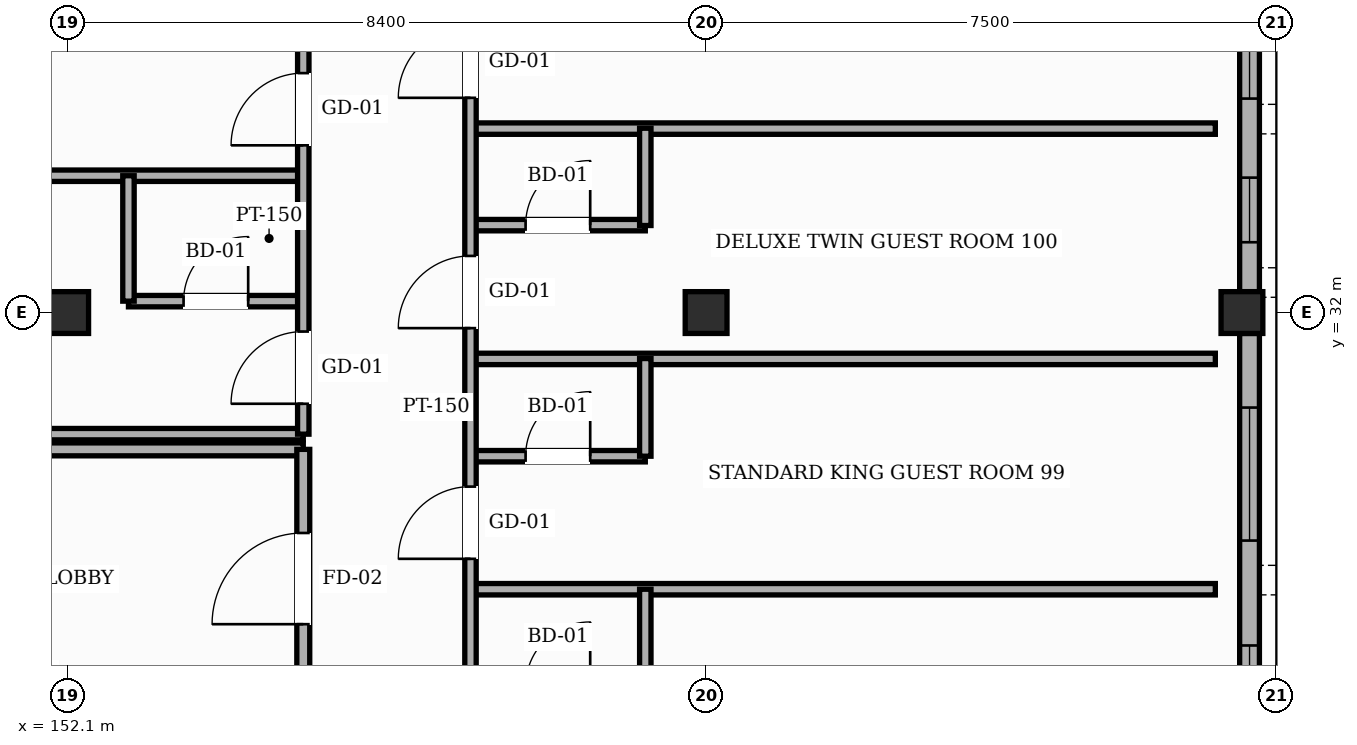
"""IFC4 building model, lengths in metres.
Left out: names, types, materials, properties, quantities, classifications, styles, units other than length and angle.
Written with IfcOpenShell. Run it as: python <this file> out.ifc"""

import sys

from ifc_helpers import new_model, si_unit, direction, frame, frame_2d, origin, origin_2d, place, context, subcontext, project, spatial, rectangle, hollow_rectangle, extrude, element, fill, save


model = new_model("IFC4")
c1 = context("Model", 3, precision=1e-05, world=origin(), true_north=direction((0.0, 1.0)))
c2 = subcontext(c1, "Body", "Model", "MODEL_VIEW")
j1 = project(units=[si_unit("LENGTHUNIT", "METRE"), si_unit("PLANEANGLEUNIT", "RADIAN")], contexts=[c1])
p1 = place(None, origin())
s1 = spatial("IfcSite", under=j1, at=p1, CompositionType="ELEMENT")
p2 = place(p1, origin())
s2 = spatial("IfcBuilding", under=s1, at=p2, CompositionType="ELEMENT")
p3 = place(p2, frame((0.0, 0.0, 24.6)))
s3 = spatial("IfcBuildingStorey", under=s2, at=p3, CompositionType="ELEMENT", Elevation=24.6)
for number, where, z_axis, x_axis in (
    (1, (152.1, 32.0, 0.0), (0.0, 0.0, 1.0), (1.0, 0.0, 0.0)),
    (2, (160.5, 32.0, 0.0), (0.0, 0.0, 1.0), (1.0, 0.0, 0.0)),
    (3, (167.55, 32.0, 0.0), (0.0, 0.0, 1.0), (1.0, 0.0, 0.0)),
):
    element("IfcColumn", number, at=place(p3, frame(where, z_axis=z_axis, x_axis=x_axis)), inside=s3, PredefinedType="COLUMN", context=c2, shape_type="SweptSolid", body=[
        extrude(hollow_rectangle(XDim=0.55, YDim=0.55, WallThickness=0.022, InnerFilletRadius=0.022, OuterFilletRadius=0.044, at=origin_2d()), origin(), (0.0, 0.0, 1.0), 3.6),
    ])
p4 = place(p3, frame((167.65, 31.725, 0.0), z_axis=(0.0, 0.0, 1.0), x_axis=(0.0, -1.0, 0.0)))
e4 = element("IfcWall", 4, at=p4, inside=s3, PredefinedType="SOLIDWALL", context=c2, shape_type="SweptSolid", body=[
    extrude(rectangle(XDim=7.45, YDim=0.26, at=frame_2d((3.725, 0.0))), origin(), (0.0, 0.0, 1.0), 2.755),
])
p5 = place(p4, frame((4.105, 0.0, 0.85)))
e5 = element("IfcOpeningElement", 5, at=p5, cuts=e4, PredefinedType="OPENING", context=c2, shape_type="SweptSolid", body=[
    extrude(rectangle(XDim=1.55, YDim=1.35, at=frame_2d((0.775, 0.675))), frame((0.0, 0.14, 0.0), z_axis=(0.0, -1.0, 0.0), x_axis=(1.0, 0.0, 0.0)), (0.0, 0.0, 1.0), 0.28),
])
p6 = place(p4, frame((0.975, 0.0, 0.85)))
e6 = element("IfcOpeningElement", 6, at=p6, cuts=e4, PredefinedType="OPENING", context=c2, shape_type="SweptSolid", body=[
    extrude(rectangle(XDim=1.75, YDim=1.35, at=frame_2d((0.875, 0.675))), frame((0.0, 0.14, 0.0), z_axis=(0.0, -1.0, 0.0), x_axis=(1.0, 0.0, 0.0)), (0.0, 0.0, 1.0), 0.28),
])
p7 = place(p3, frame((167.65, 40.625, 0.0), z_axis=(0.0, 0.0, 1.0), x_axis=(0.0, -1.0, 0.0)))
e7 = element("IfcWall", 7, at=p7, inside=s3, PredefinedType="SOLIDWALL", context=c2, shape_type="SweptSolid", body=[
    extrude(rectangle(XDim=8.35, YDim=0.26, at=frame_2d((4.175, 0.0))), origin(), (0.0, 0.0, 1.0), 2.755),
])
p8 = place(p7, frame((6.85, 0.0, 0.85)))
e8 = element("IfcOpeningElement", 8, at=p8, cuts=e7, PredefinedType="OPENING", context=c2, shape_type="SweptSolid", body=[
    extrude(rectangle(XDim=0.85, YDim=1.35, at=frame_2d((0.425, 0.675))), frame((0.0, 0.14, 0.0), z_axis=(0.0, -1.0, 0.0), x_axis=(1.0, 0.0, 0.0)), (0.0, 0.0, 1.0), 0.28),
])
p9 = place(p7, frame((3.56, 0.0, 0.85)))
e9 = element("IfcOpeningElement", 9, at=p9, cuts=e7, PredefinedType="OPENING", context=c2, shape_type="SweptSolid", body=[
    extrude(rectangle(XDim=2.25, YDim=1.35, at=frame_2d((1.125, 0.675))), frame((0.0, 0.14, 0.0), z_axis=(0.0, -1.0, 0.0), x_axis=(1.0, 0.0, 0.0)), (0.0, 0.0, 1.0), 0.28),
])
p10 = place(p7, frame((1.03, 0.0, 0.85)))
e10 = element("IfcOpeningElement", 10, at=p10, cuts=e7, PredefinedType="OPENING", context=c2, shape_type="SweptSolid", body=[
    extrude(rectangle(XDim=1.25, YDim=1.35, at=frame_2d((0.625, 0.675))), frame((0.0, 0.14, 0.0), z_axis=(0.0, -1.0, 0.0), x_axis=(1.0, 0.0, 0.0)), (0.0, 0.0, 1.0), 0.28),
])
p11 = place(p3, frame((157.4, 28.36, 0.0), z_axis=(0.0, 0.0, 1.0), x_axis=(1.0, 0.0, 0.0)))
e11 = element("IfcWall", 11, at=p11, inside=s3, PredefinedType="PARTITIONING", context=c2, shape_type="SweptSolid", body=[
    extrude(rectangle(XDim=9.8, YDim=0.15, at=frame_2d((4.9, 0.0))), origin(), (0.0, 0.0, 1.0), 3.365),
])
p12 = place(p3, frame((157.4, 30.11, 0.0), z_axis=(0.0, 0.0, 1.0), x_axis=(1.0, 0.0, 0.0)))
e12 = element("IfcWall", 12, at=p12, inside=s3, PredefinedType="PARTITIONING", context=c2, shape_type="SweptSolid", body=[
    extrude(rectangle(XDim=2.3, YDim=0.15, at=frame_2d((1.15, 0.0))), origin(), (0.0, 0.0, 1.0), 3.365),
])
p13 = place(p12, frame((0.725, 0.0, 0.0)))
e13 = element("IfcOpeningElement", 13, at=p13, cuts=e12, PredefinedType="OPENING", context=c2, shape_type="SweptSolid", body=[
    extrude(rectangle(XDim=0.85, YDim=2.1, at=frame_2d((0.425, 1.05))), frame((0.0, 0.085, 0.0), z_axis=(0.0, -1.0, 0.0), x_axis=(1.0, 0.0, 0.0)), (0.0, 0.0, 1.0), 0.17),
])
p14 = place(p3, frame((147.8, 30.2, 0.0), z_axis=(0.0, 0.0, 1.0), x_axis=(1.0, 0.0, 0.0)))
e14 = element("IfcWall", 14, at=p14, inside=s3, PredefinedType="PARTITIONING", context=c2, shape_type="SweptSolid", body=[
    extrude(rectangle(XDim=7.4, YDim=0.17, at=frame_2d((3.7, 0.0))), origin(), (0.0, 0.0, 1.0), 3.365),
])
p15 = place(p3, frame((144.2, 30.4, 0.0), z_axis=(0.0, 0.0, 1.0), x_axis=(1.0, 0.0, 0.0)))
e15 = element("IfcWall", 15, at=p15, inside=s3, PredefinedType="PARTITIONING", context=c2, shape_type="SweptSolid", body=[
    extrude(rectangle(XDim=11.0, YDim=0.15, at=frame_2d((5.5, 0.0))), origin(), (0.0, 0.0, 1.0), 3.365),
])
p16 = place(p3, frame((157.4, 31.39, 0.0), z_axis=(0.0, 0.0, 1.0), x_axis=(1.0, 0.0, 0.0)))
e16 = element("IfcWall", 16, at=p16, inside=s3, PredefinedType="PARTITIONING", context=c2, shape_type="SweptSolid", body=[
    extrude(rectangle(XDim=9.8, YDim=0.15, at=frame_2d((4.9, 0.0))), origin(), (0.0, 0.0, 1.0), 3.365),
])
p17 = place(p3, frame((152.9, 32.15, 0.0), z_axis=(0.0, 0.0, 1.0), x_axis=(1.0, 0.0, 0.0)))
e17 = element("IfcWall", 17, at=p17, inside=s3, PredefinedType="PARTITIONING", context=c2, shape_type="SweptSolid", body=[
    extrude(rectangle(XDim=2.3, YDim=0.15, at=frame_2d((1.15, 0.0))), origin(), (0.0, 0.0, 1.0), 2.805),
])
p18 = place(p17, frame((0.725, 0.0, 0.0)))
e18 = element("IfcOpeningElement", 18, at=p18, cuts=e17, PredefinedType="OPENING", context=c2, shape_type="SweptSolid", body=[
    extrude(rectangle(XDim=0.85, YDim=2.1, at=frame_2d((0.425, 1.05))), frame((0.0, 0.085, 0.0), z_axis=(0.0, -1.0, 0.0), x_axis=(1.0, 0.0, 0.0)), (0.0, 0.0, 1.0), 0.17),
])
p19 = place(p3, frame((157.4, 33.15, 0.0), z_axis=(0.0, 0.0, 1.0), x_axis=(1.0, 0.0, 0.0)))
e19 = element("IfcWall", 19, at=p19, inside=s3, PredefinedType="PARTITIONING", context=c2, shape_type="SweptSolid", body=[
    extrude(rectangle(XDim=2.3, YDim=0.15, at=frame_2d((1.15, 0.0))), origin(), (0.0, 0.0, 1.0), 3.365),
])
p20 = place(p19, frame((0.725, 0.0, 0.0)))
e20 = element("IfcOpeningElement", 20, at=p20, cuts=e19, PredefinedType="OPENING", context=c2, shape_type="SweptSolid", body=[
    extrude(rectangle(XDim=0.85, YDim=2.1, at=frame_2d((0.425, 1.05))), frame((0.0, 0.085, 0.0), z_axis=(0.0, -1.0, 0.0), x_axis=(1.0, 0.0, 0.0)), (0.0, 0.0, 1.0), 0.17),
])
p21 = place(p3, frame((144.2, 33.8, 0.0), z_axis=(0.0, 0.0, 1.0), x_axis=(1.0, 0.0, 0.0)))
e21 = element("IfcWall", 21, at=p21, inside=s3, PredefinedType="PARTITIONING", context=c2, shape_type="SweptSolid", body=[
    extrude(rectangle(XDim=11.0, YDim=0.15, at=frame_2d((5.5, 0.0))), origin(), (0.0, 0.0, 1.0), 3.365),
])
p22 = place(p3, frame((157.4, 34.42, 0.0), z_axis=(0.0, 0.0, 1.0), x_axis=(1.0, 0.0, 0.0)))
e22 = element("IfcWall", 22, at=p22, inside=s3, PredefinedType="PARTITIONING", context=c2, shape_type="SweptSolid", body=[
    extrude(rectangle(XDim=9.8, YDim=0.15, at=frame_2d((4.9, 0.0))), origin(), (0.0, 0.0, 1.0), 3.365),
])
p23 = place(p3, frame((152.9, 32.15, 0.0), z_axis=(0.0, 0.0, 1.0), x_axis=(0.0, 1.0, 0.0)))
e23 = element("IfcWall", 23, at=p23, inside=s3, PredefinedType="PARTITIONING", context=c2, shape_type="SweptSolid", body=[
    extrude(rectangle(XDim=1.65, YDim=0.15, at=frame_2d((0.825, 0.0))), origin(), (0.0, 0.0, 1.0), 3.365),
])
p24 = place(p3, frame((155.2, 26.8, 0.0), z_axis=(0.0, 0.0, 1.0), x_axis=(0.0, 1.0, 0.0)))
e24 = element("IfcWall", 24, at=p24, inside=s3, PredefinedType="PARTITIONING", context=c2, shape_type="SweptSolid", body=[
    extrude(rectangle(XDim=3.4, YDim=0.17, at=frame_2d((1.7, 0.0))), origin(), (0.0, 0.0, 1.0), 3.365),
])
p25 = place(p24, frame((1.1, 0.0, 0.0)))
e25 = element("IfcOpeningElement", 25, at=p25, cuts=e24, PredefinedType="OPENING", context=c2, shape_type="SweptSolid", body=[
    extrude(rectangle(XDim=1.2, YDim=2.2, at=frame_2d((0.6, 1.1))), frame((0.0, 0.095, 0.0), z_axis=(0.0, -1.0, 0.0), x_axis=(1.0, 0.0, 0.0)), (0.0, 0.0, 1.0), 0.19),
])
p26 = place(p3, frame((155.2, 30.4, 0.0), z_axis=(0.0, 0.0, 1.0), x_axis=(0.0, 1.0, 0.0)))
e26 = element("IfcWall", 26, at=p26, inside=s3, PredefinedType="PARTITIONING", context=c2, shape_type="SweptSolid", body=[
    extrude(rectangle(XDim=10.2, YDim=0.15, at=frame_2d((5.1, 0.0))), origin(), (0.0, 0.0, 1.0), 3.365),
])
p27 = place(p26, frame((0.4, 0.0, 0.0)))
e27 = element("IfcOpeningElement", 27, at=p27, cuts=e26, PredefinedType="OPENING", context=c2, shape_type="SweptSolid", body=[
    extrude(rectangle(XDim=0.95, YDim=2.15, at=frame_2d((0.475, 1.075))), frame((0.0, 0.085, 0.0), z_axis=(0.0, -1.0, 0.0), x_axis=(1.0, 0.0, 0.0)), (0.0, 0.0, 1.0), 0.17),
])
p28 = place(p26, frame((3.8, 0.0, 0.0)))
e28 = element("IfcOpeningElement", 28, at=p28, cuts=e26, PredefinedType="OPENING", context=c2, shape_type="SweptSolid", body=[
    extrude(rectangle(XDim=0.95, YDim=2.15, at=frame_2d((0.475, 1.075))), frame((0.0, 0.085, 0.0), z_axis=(0.0, -1.0, 0.0), x_axis=(1.0, 0.0, 0.0)), (0.0, 0.0, 1.0), 0.17),
])
p29 = place(p26, frame((7.2, 0.0, 0.0)))
e29 = element("IfcOpeningElement", 29, at=p29, cuts=e26, PredefinedType="OPENING", context=c2, shape_type="SweptSolid", body=[
    extrude(rectangle(XDim=0.95, YDim=2.15, at=frame_2d((0.475, 1.075))), frame((0.0, 0.085, 0.0), z_axis=(0.0, -1.0, 0.0), x_axis=(1.0, 0.0, 0.0)), (0.0, 0.0, 1.0), 0.17),
])
p30 = place(p3, frame((157.4, 22.3, 0.0), z_axis=(0.0, 0.0, 1.0), x_axis=(0.0, 1.0, 0.0)))
e30 = element("IfcWall", 30, at=p30, inside=s3, PredefinedType="PARTITIONING", context=c2, shape_type="SweptSolid", body=[
    extrude(rectangle(XDim=48.5, YDim=0.15, at=frame_2d((24.25, 0.0))), origin(), (0.0, 0.0, 1.0), 3.365),
])
p31 = place(p30, frame((0.4, 0.0, 0.0)))
e31 = element("IfcOpeningElement", 31, at=p31, cuts=e30, PredefinedType="OPENING", context=c2, shape_type="SweptSolid", body=[
    extrude(rectangle(XDim=0.95, YDim=2.15, at=frame_2d((0.475, 1.075))), frame((0.0, 0.085, 0.0), z_axis=(0.0, -1.0, 0.0), x_axis=(1.0, 0.0, 0.0)), (0.0, 0.0, 1.0), 0.17),
])
p32 = place(p30, frame((3.43, 0.0, 0.0)))
e32 = element("IfcOpeningElement", 32, at=p32, cuts=e30, PredefinedType="OPENING", context=c2, shape_type="SweptSolid", body=[
    extrude(rectangle(XDim=0.95, YDim=2.15, at=frame_2d((0.475, 1.075))), frame((0.0, 0.085, 0.0), z_axis=(0.0, -1.0, 0.0), x_axis=(1.0, 0.0, 0.0)), (0.0, 0.0, 1.0), 0.17),
])
p33 = place(p30, frame((6.46, 0.0, 0.0)))
e33 = element("IfcOpeningElement", 33, at=p33, cuts=e30, PredefinedType="OPENING", context=c2, shape_type="SweptSolid", body=[
    extrude(rectangle(XDim=0.95, YDim=2.15, at=frame_2d((0.475, 1.075))), frame((0.0, 0.085, 0.0), z_axis=(0.0, -1.0, 0.0), x_axis=(1.0, 0.0, 0.0)), (0.0, 0.0, 1.0), 0.17),
])
p34 = place(p30, frame((9.495, 0.0, 0.0)))
e34 = element("IfcOpeningElement", 34, at=p34, cuts=e30, PredefinedType="OPENING", context=c2, shape_type="SweptSolid", body=[
    extrude(rectangle(XDim=0.95, YDim=2.15, at=frame_2d((0.475, 1.075))), frame((0.0, 0.085, 0.0), z_axis=(0.0, -1.0, 0.0), x_axis=(1.0, 0.0, 0.0)), (0.0, 0.0, 1.0), 0.17),
])
p35 = place(p30, frame((12.525, 0.0, 0.0)))
e35 = element("IfcOpeningElement", 35, at=p35, cuts=e30, PredefinedType="OPENING", context=c2, shape_type="SweptSolid", body=[
    extrude(rectangle(XDim=0.95, YDim=2.15, at=frame_2d((0.475, 1.075))), frame((0.0, 0.085, 0.0), z_axis=(0.0, -1.0, 0.0), x_axis=(1.0, 0.0, 0.0)), (0.0, 0.0, 1.0), 0.17),
])
p36 = place(p30, frame((15.555, 0.0, 0.0)))
e36 = element("IfcOpeningElement", 36, at=p36, cuts=e30, PredefinedType="OPENING", context=c2, shape_type="SweptSolid", body=[
    extrude(rectangle(XDim=0.95, YDim=2.15, at=frame_2d((0.475, 1.075))), frame((0.0, 0.085, 0.0), z_axis=(0.0, -1.0, 0.0), x_axis=(1.0, 0.0, 0.0)), (0.0, 0.0, 1.0), 0.17),
])
p37 = place(p30, frame((18.585, 0.0, 0.0)))
e37 = element("IfcOpeningElement", 37, at=p37, cuts=e30, PredefinedType="OPENING", context=c2, shape_type="SweptSolid", body=[
    extrude(rectangle(XDim=0.95, YDim=2.15, at=frame_2d((0.475, 1.075))), frame((0.0, 0.085, 0.0), z_axis=(0.0, -1.0, 0.0), x_axis=(1.0, 0.0, 0.0)), (0.0, 0.0, 1.0), 0.17),
])
p38 = place(p30, frame((21.62, 0.0, 0.0)))
e38 = element("IfcOpeningElement", 38, at=p38, cuts=e30, PredefinedType="OPENING", context=c2, shape_type="SweptSolid", body=[
    extrude(rectangle(XDim=0.95, YDim=2.15, at=frame_2d((0.475, 1.075))), frame((0.0, 0.085, 0.0), z_axis=(0.0, -1.0, 0.0), x_axis=(1.0, 0.0, 0.0)), (0.0, 0.0, 1.0), 0.17),
])
p39 = place(p30, frame((24.65, 0.0, 0.0)))
e39 = element("IfcOpeningElement", 39, at=p39, cuts=e30, PredefinedType="OPENING", context=c2, shape_type="SweptSolid", body=[
    extrude(rectangle(XDim=0.95, YDim=2.15, at=frame_2d((0.475, 1.075))), frame((0.0, 0.085, 0.0), z_axis=(0.0, -1.0, 0.0), x_axis=(1.0, 0.0, 0.0)), (0.0, 0.0, 1.0), 0.17),
])
p40 = place(p30, frame((27.68, 0.0, 0.0)))
e40 = element("IfcOpeningElement", 40, at=p40, cuts=e30, PredefinedType="OPENING", context=c2, shape_type="SweptSolid", body=[
    extrude(rectangle(XDim=0.95, YDim=2.15, at=frame_2d((0.475, 1.075))), frame((0.0, 0.085, 0.0), z_axis=(0.0, -1.0, 0.0), x_axis=(1.0, 0.0, 0.0)), (0.0, 0.0, 1.0), 0.17),
])
p41 = place(p30, frame((30.71, 0.0, 0.0)))
e41 = element("IfcOpeningElement", 41, at=p41, cuts=e30, PredefinedType="OPENING", context=c2, shape_type="SweptSolid", body=[
    extrude(rectangle(XDim=0.95, YDim=2.15, at=frame_2d((0.475, 1.075))), frame((0.0, 0.085, 0.0), z_axis=(0.0, -1.0, 0.0), x_axis=(1.0, 0.0, 0.0)), (0.0, 0.0, 1.0), 0.17),
])
p42 = place(p30, frame((33.745, 0.0, 0.0)))
e42 = element("IfcOpeningElement", 42, at=p42, cuts=e30, PredefinedType="OPENING", context=c2, shape_type="SweptSolid", body=[
    extrude(rectangle(XDim=0.95, YDim=2.15, at=frame_2d((0.475, 1.075))), frame((0.0, 0.085, 0.0), z_axis=(0.0, -1.0, 0.0), x_axis=(1.0, 0.0, 0.0)), (0.0, 0.0, 1.0), 0.17),
])
p43 = place(p30, frame((36.775, 0.0, 0.0)))
e43 = element("IfcOpeningElement", 43, at=p43, cuts=e30, PredefinedType="OPENING", context=c2, shape_type="SweptSolid", body=[
    extrude(rectangle(XDim=0.95, YDim=2.15, at=frame_2d((0.475, 1.075))), frame((0.0, 0.085, 0.0), z_axis=(0.0, -1.0, 0.0), x_axis=(1.0, 0.0, 0.0)), (0.0, 0.0, 1.0), 0.17),
])
p44 = place(p30, frame((39.805, 0.0, 0.0)))
e44 = element("IfcOpeningElement", 44, at=p44, cuts=e30, PredefinedType="OPENING", context=c2, shape_type="SweptSolid", body=[
    extrude(rectangle(XDim=0.95, YDim=2.15, at=frame_2d((0.475, 1.075))), frame((0.0, 0.085, 0.0), z_axis=(0.0, -1.0, 0.0), x_axis=(1.0, 0.0, 0.0)), (0.0, 0.0, 1.0), 0.17),
])
p45 = place(p30, frame((42.84, 0.0, 0.0)))
e45 = element("IfcOpeningElement", 45, at=p45, cuts=e30, PredefinedType="OPENING", context=c2, shape_type="SweptSolid", body=[
    extrude(rectangle(XDim=0.95, YDim=2.15, at=frame_2d((0.475, 1.075))), frame((0.0, 0.085, 0.0), z_axis=(0.0, -1.0, 0.0), x_axis=(1.0, 0.0, 0.0)), (0.0, 0.0, 1.0), 0.17),
])
p46 = place(p30, frame((45.87, 0.0, 0.0)))
e46 = element("IfcOpeningElement", 46, at=p46, cuts=e30, PredefinedType="OPENING", context=c2, shape_type="SweptSolid", body=[
    extrude(rectangle(XDim=0.95, YDim=2.15, at=frame_2d((0.475, 1.075))), frame((0.0, 0.085, 0.0), z_axis=(0.0, -1.0, 0.0), x_axis=(1.0, 0.0, 0.0)), (0.0, 0.0, 1.0), 0.17),
])
p47 = place(p3, frame((159.7, 27.08, 0.0), z_axis=(0.0, 0.0, 1.0), x_axis=(0.0, 1.0, 0.0)))
e47 = element("IfcWall", 47, at=p47, inside=s3, PredefinedType="PARTITIONING", context=c2, shape_type="SweptSolid", body=[
    extrude(rectangle(XDim=1.28, YDim=0.15, at=frame_2d((0.64, 0.0))), origin(), (0.0, 0.0, 1.0), 3.365),
])
p48 = place(p3, frame((159.7, 30.11, 0.0), z_axis=(0.0, 0.0, 1.0), x_axis=(0.0, 1.0, 0.0)))
e48 = element("IfcWall", 48, at=p48, inside=s3, PredefinedType="PARTITIONING", context=c2, shape_type="SweptSolid", body=[
    extrude(rectangle(XDim=1.285, YDim=0.15, at=frame_2d((0.643, 0.0))), origin(), (0.0, 0.0, 1.0), 3.365),
])
p49 = place(p3, frame((159.7, 33.145, 0.0), z_axis=(0.0, 0.0, 1.0), x_axis=(0.0, 1.0, 0.0)))
e49 = element("IfcWall", 49, at=p49, inside=s3, PredefinedType="PARTITIONING", context=c2, shape_type="SweptSolid", body=[
    extrude(rectangle(XDim=1.28, YDim=0.15, at=frame_2d((0.64, 0.0))), origin(), (0.0, 0.0, 1.0), 3.365),
])
p50 = place(p5, origin())
e50 = element("IfcWindow", 50, at=p50, inside=s3, PartitioningType="SINGLE_PANEL", PredefinedType="WINDOW", context=c2, shape_type="SweptSolid", body=[
    extrude(rectangle(XDim=1.55, YDim=1.35, at=frame_2d((0.775, 0.675))), frame((0.0, 0.03, 0.0), z_axis=(0.0, -1.0, 0.0), x_axis=(1.0, 0.0, 0.0)), (0.0, 0.0, 1.0), 0.06),
])
fill(e5, e50)
p51 = place(p6, origin())
e51 = element("IfcWindow", 51, at=p51, inside=s3, PartitioningType="SINGLE_PANEL", PredefinedType="WINDOW", context=c2, shape_type="SweptSolid", body=[
    extrude(rectangle(XDim=1.75, YDim=1.35, at=frame_2d((0.875, 0.675))), frame((0.0, 0.03, 0.0), z_axis=(0.0, -1.0, 0.0), x_axis=(1.0, 0.0, 0.0)), (0.0, 0.0, 1.0), 0.06),
])
fill(e6, e51)
p52 = place(p8, origin())
e52 = element("IfcWindow", 52, at=p52, inside=s3, PartitioningType="SINGLE_PANEL", PredefinedType="WINDOW", context=c2, shape_type="SweptSolid", body=[
    extrude(rectangle(XDim=0.85, YDim=1.35, at=frame_2d((0.425, 0.675))), frame((0.0, 0.03, 0.0), z_axis=(0.0, -1.0, 0.0), x_axis=(1.0, 0.0, 0.0)), (0.0, 0.0, 1.0), 0.06),
])
fill(e8, e52)
p53 = place(p9, origin())
e53 = element("IfcWindow", 53, at=p53, inside=s3, PartitioningType="SINGLE_PANEL", PredefinedType="WINDOW", context=c2, shape_type="SweptSolid", body=[
    extrude(rectangle(XDim=2.25, YDim=1.35, at=frame_2d((1.125, 0.675))), frame((0.0, 0.03, 0.0), z_axis=(0.0, -1.0, 0.0), x_axis=(1.0, 0.0, 0.0)), (0.0, 0.0, 1.0), 0.06),
])
fill(e9, e53)
p54 = place(p25, origin())
e54 = element("IfcDoor", 54, at=p54, inside=s3, OperationType="SINGLE_SWING_LEFT", PredefinedType="DOOR", context=c2, shape_type="SweptSolid", body=[
    extrude(rectangle(XDim=1.2, YDim=2.2, at=frame_2d((0.6, 1.1))), frame((0.0, 0.025, 0.0), z_axis=(0.0, -1.0, 0.0), x_axis=(1.0, 0.0, 0.0)), (0.0, 0.0, 1.0), 0.05),
])
fill(e25, e54)
p55 = place(p27, origin())
e55 = element("IfcDoor", 55, at=p55, inside=s3, OperationType="SINGLE_SWING_LEFT", PredefinedType="DOOR", context=c2, shape_type="SweptSolid", body=[
    extrude(rectangle(XDim=0.95, YDim=2.15, at=frame_2d((0.475, 1.075))), frame((0.0, 0.025, 0.0), z_axis=(0.0, -1.0, 0.0), x_axis=(1.0, 0.0, 0.0)), (0.0, 0.0, 1.0), 0.05),
])
fill(e27, e55)
p56 = place(p18, origin())
e56 = element("IfcDoor", 56, at=p56, inside=s3, OperationType="SINGLE_SWING_RIGHT", PredefinedType="DOOR", context=c2, shape_type="SweptSolid", body=[
    extrude(rectangle(XDim=0.85, YDim=2.1, at=frame_2d((0.425, 1.05))), frame((0.0, 0.025, 0.0), z_axis=(0.0, -1.0, 0.0), x_axis=(1.0, 0.0, 0.0)), (0.0, 0.0, 1.0), 0.05),
])
fill(e18, e56)
p57 = place(p28, origin())
e57 = element("IfcDoor", 57, at=p57, inside=s3, OperationType="SINGLE_SWING_LEFT", PredefinedType="DOOR", context=c2, shape_type="SweptSolid", body=[
    extrude(rectangle(XDim=0.95, YDim=2.15, at=frame_2d((0.475, 1.075))), frame((0.0, 0.025, 0.0), z_axis=(0.0, -1.0, 0.0), x_axis=(1.0, 0.0, 0.0)), (0.0, 0.0, 1.0), 0.05),
])
fill(e28, e57)
p58 = place(p33, origin())
e58 = element("IfcDoor", 58, at=p58, inside=s3, OperationType="SINGLE_SWING_LEFT", PredefinedType="DOOR", context=c2, shape_type="SweptSolid", body=[
    extrude(rectangle(XDim=0.95, YDim=2.15, at=frame_2d((0.475, 1.075))), frame((0.0, 0.025, 0.0), z_axis=(0.0, -1.0, 0.0), x_axis=(1.0, 0.0, 0.0)), (0.0, 0.0, 1.0), 0.05),
])
fill(e33, e58)
p59 = place(p13, origin())
e59 = element("IfcDoor", 59, at=p59, inside=s3, OperationType="SINGLE_SWING_RIGHT", PredefinedType="DOOR", context=c2, shape_type="SweptSolid", body=[
    extrude(rectangle(XDim=0.85, YDim=2.1, at=frame_2d((0.425, 1.05))), frame((0.0, 0.025, 0.0), z_axis=(0.0, -1.0, 0.0), x_axis=(1.0, 0.0, 0.0)), (0.0, 0.0, 1.0), 0.05),
])
fill(e13, e59)
p60 = place(p34, origin())
e60 = element("IfcDoor", 60, at=p60, inside=s3, OperationType="SINGLE_SWING_LEFT", PredefinedType="DOOR", context=c2, shape_type="SweptSolid", body=[
    extrude(rectangle(XDim=0.95, YDim=2.15, at=frame_2d((0.475, 1.075))), frame((0.0, 0.025, 0.0), z_axis=(0.0, -1.0, 0.0), x_axis=(1.0, 0.0, 0.0)), (0.0, 0.0, 1.0), 0.05),
])
fill(e34, e60)
p61 = place(p20, origin())
e61 = element("IfcDoor", 61, at=p61, inside=s3, OperationType="SINGLE_SWING_RIGHT", PredefinedType="DOOR", context=c2, shape_type="SweptSolid", body=[
    extrude(rectangle(XDim=0.85, YDim=2.1, at=frame_2d((0.425, 1.05))), frame((0.0, 0.025, 0.0), z_axis=(0.0, -1.0, 0.0), x_axis=(1.0, 0.0, 0.0)), (0.0, 0.0, 1.0), 0.05),
])
fill(e20, e61)
p62 = place(p35, origin())
e62 = element("IfcDoor", 62, at=p62, inside=s3, OperationType="SINGLE_SWING_LEFT", PredefinedType="DOOR", context=c2, shape_type="SweptSolid", body=[
    extrude(rectangle(XDim=0.95, YDim=2.15, at=frame_2d((0.475, 1.075))), frame((0.0, 0.025, 0.0), z_axis=(0.0, -1.0, 0.0), x_axis=(1.0, 0.0, 0.0)), (0.0, 0.0, 1.0), 0.05),
])
fill(e35, e62)
save(model, sys.argv[1])
